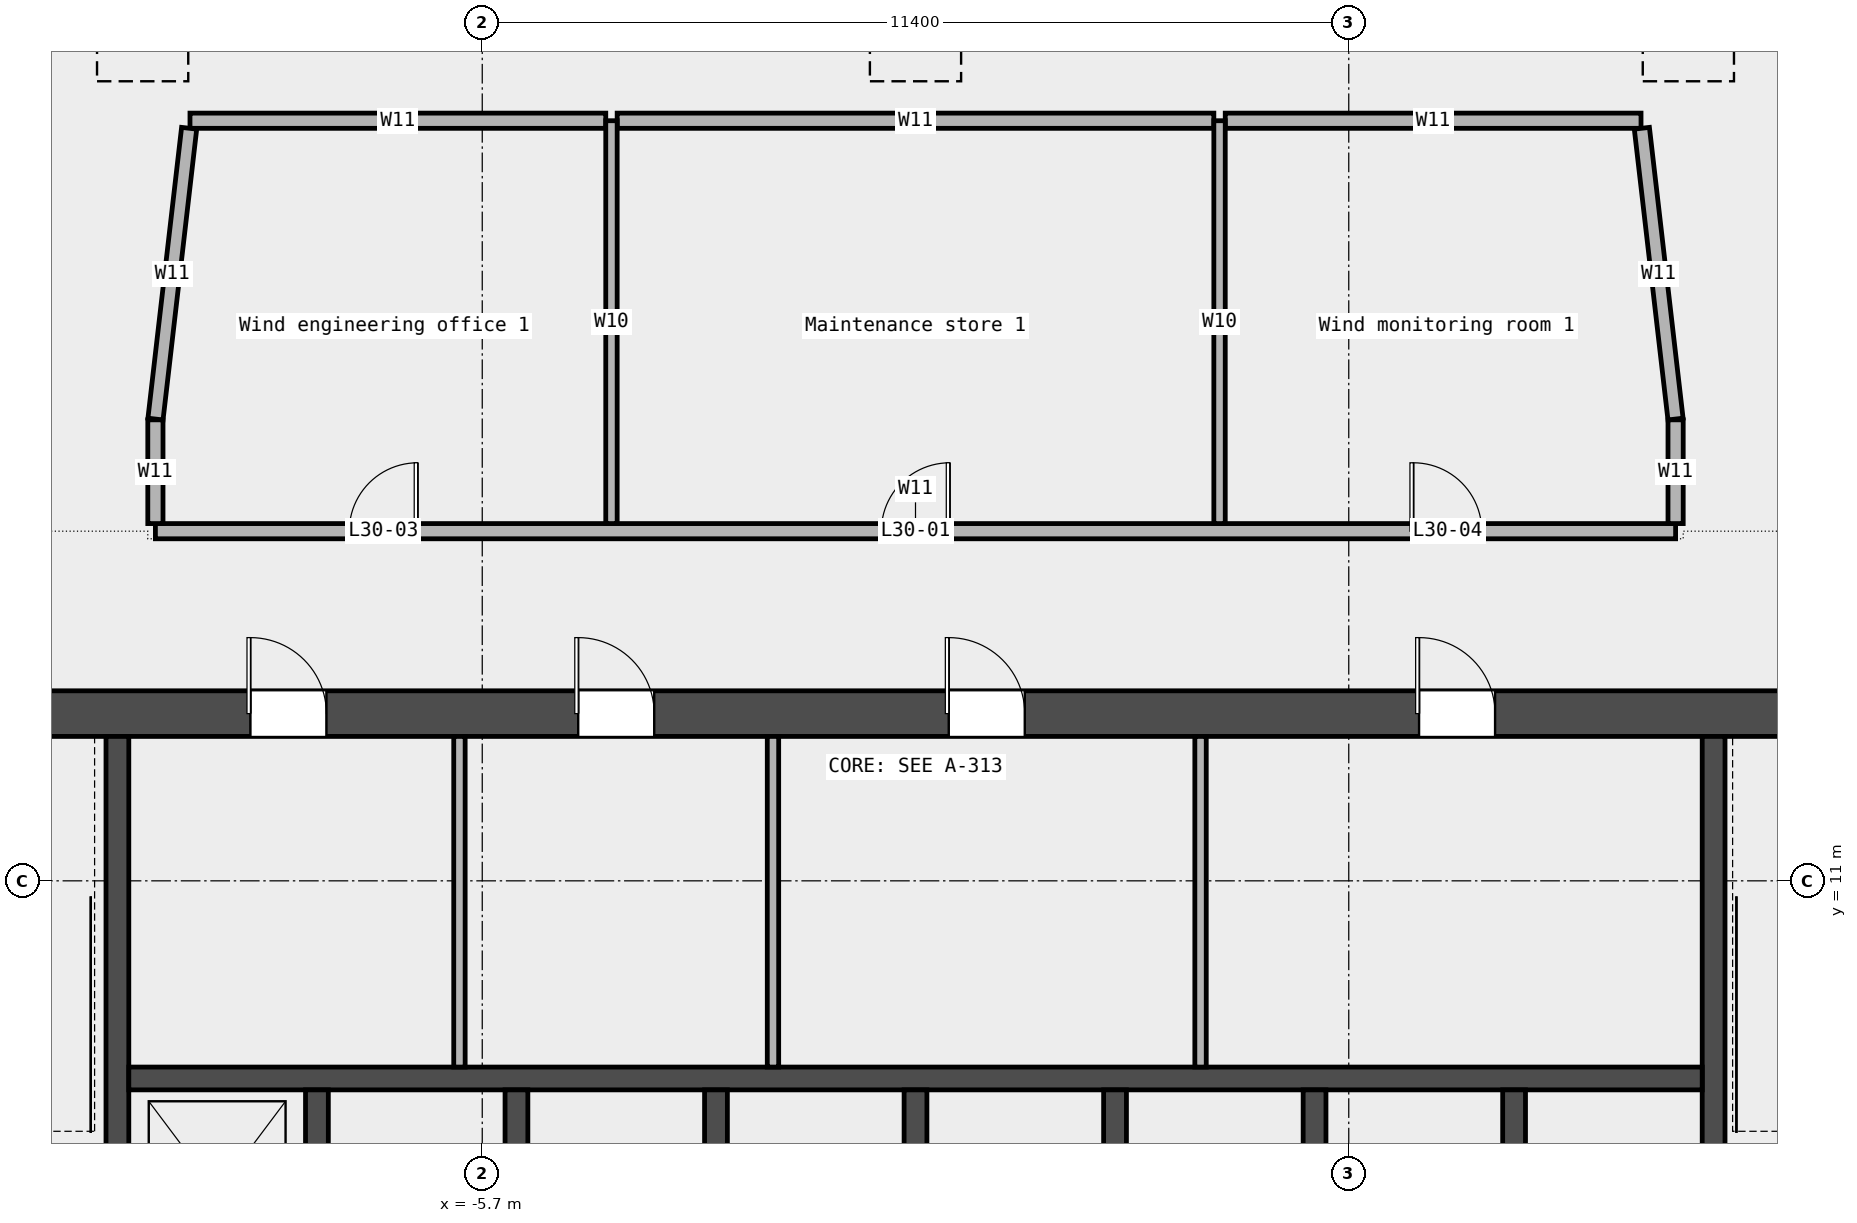
"""IFC4 building model, lengths in metres.
Left out: names, types, materials, properties, quantities, classifications, styles, units other than length and angle.
Written with IfcOpenShell. Run it as: python <this file> out.ifc"""

import sys

from ifc_helpers import new_model, si_unit, direction, frame, frame_2d, origin, origin_2d, place, context, subcontext, project, spatial, rectangle, extrude, element, fill, save


model = new_model("IFC4")
c1 = context("Model", 3, precision=1e-05, world=origin(), true_north=direction((0.0, 1.0)))
c2 = subcontext(c1, "Body", "Model", "MODEL_VIEW")
j1 = project(units=[si_unit("LENGTHUNIT", "METRE"), si_unit("PLANEANGLEUNIT", "RADIAN")], contexts=[c1])
p1 = place(None, origin())
s1 = spatial("IfcSite", under=j1, at=p1, CompositionType="ELEMENT")
p2 = place(p1, origin())
s2 = spatial("IfcBuilding", under=s1, at=p2, CompositionType="ELEMENT")
p3 = place(p2, frame((0.0, 0.0, 148.6)))
s3 = spatial("IfcBuildingStorey", under=s2, at=p3, CompositionType="ELEMENT", Elevation=148.6)
p4 = place(p3, frame((11.525, 24.5, 0.0), z_axis=(-0.160463379213, -0.281547116603, 0.94603526629), x_axis=(0.868801799195, -0.495160008196, 0.0)))
e1 = element("IfcColumn", 1, at=p4, inside=s3, PredefinedType="COLUMN", context=c2, shape_type="SweptSolid", body=[
    extrude(rectangle(XDim=1.2, YDim=1.2, at=origin_2d()), origin(), (0.0, 0.0, 1.0), 8.456),
])
p5 = place(p3, frame((0.0, 24.5, 0.0), z_axis=(0.0, -0.285243358686, 0.958455124837), x_axis=(1.0, 0.0, 0.0)))
e2 = element("IfcColumn", 2, at=p5, inside=s3, PredefinedType="COLUMN", context=c2, shape_type="SweptSolid", body=[
    extrude(rectangle(XDim=1.2, YDim=1.2, at=origin_2d()), origin(), (0.0, 0.0, 1.0), 8.347),
])
p6 = place(p3, frame((-11.525, 24.5, 0.0), z_axis=(0.160463379213, -0.281547116603, 0.94603526629), x_axis=(0.868801799195, 0.495160008196, 0.0)))
e3 = element("IfcColumn", 3, at=p6, inside=s3, PredefinedType="COLUMN", context=c2, shape_type="SweptSolid", body=[
    extrude(rectangle(XDim=1.2, YDim=1.2, at=origin_2d()), origin(), (0.0, 0.0, 1.0), 8.456),
])
p7 = place(p3, frame((-10.0, 15.6, 0.0), z_axis=(0.0, 0.0, 1.0), x_axis=(1.0, 0.0, 0.0)))
e4 = element("IfcWall", 4, at=p7, inside=s3, PredefinedType="PARTITIONING", context=c2, shape_type="SweptSolid", body=[
    extrude(rectangle(XDim=20.0, YDim=0.2, at=frame_2d((10.0, 0.0))), origin(), (0.0, 0.0, 1.0), 8.0),
])
p8 = place(p7, frame((9.55, 0.0, 0.0)))
e5 = element("IfcOpeningElement", 5, at=p8, cuts=e4, PredefinedType="OPENING", context=c2, shape_type="SweptSolid", body=[
    extrude(rectangle(XDim=0.9, YDim=2.1, at=frame_2d((0.45, 1.05))), frame((0.0, 0.112, 0.0), z_axis=(0.0, -1.0, 0.0), x_axis=(1.0, 0.0, 0.0)), (0.0, 0.0, 1.0), 0.224),
])
p9 = place(p7, frame((2.55, 0.0, 0.0)))
e6 = element("IfcOpeningElement", 6, at=p9, cuts=e4, PredefinedType="OPENING", context=c2, shape_type="SweptSolid", body=[
    extrude(rectangle(XDim=0.9, YDim=2.1, at=frame_2d((0.45, 1.05))), frame((0.0, 0.112, 0.0), z_axis=(0.0, -1.0, 0.0), x_axis=(1.0, 0.0, 0.0)), (0.0, 0.0, 1.0), 0.224),
])
p10 = place(p7, frame((16.55, 0.0, 0.0)))
e7 = element("IfcOpeningElement", 7, at=p10, cuts=e4, PredefinedType="OPENING", context=c2, shape_type="SweptSolid", body=[
    extrude(rectangle(XDim=0.9, YDim=2.1, at=frame_2d((0.45, 1.05))), frame((0.0, 0.112, 0.0), z_axis=(0.0, -1.0, 0.0), x_axis=(1.0, 0.0, 0.0)), (0.0, 0.0, 1.0), 0.224),
])
p11 = place(p3, frame((-9.545, 21.0, 0.0), z_axis=(0.0, 0.0, 1.0), x_axis=(1.0, 0.0, 0.0)))
e8 = element("IfcWall", 8, at=p11, inside=s3, PredefinedType="PARTITIONING", context=c2, shape_type="SweptSolid", body=[
    extrude(rectangle(XDim=5.47, YDim=0.2, at=frame_2d((2.735, 0.0))), origin(), (0.0, 0.0, 1.0), 8.0),
])
p12 = place(p3, frame((-3.925, 21.0, 0.0), z_axis=(0.0, 0.0, 1.0), x_axis=(1.0, 0.0, 0.0)))
e9 = element("IfcWall", 9, at=p12, inside=s3, PredefinedType="PARTITIONING", context=c2, shape_type="SweptSolid", body=[
    extrude(rectangle(XDim=7.85, YDim=0.2, at=frame_2d((3.925, 0.0))), origin(), (0.0, 0.0, 1.0), 8.0),
])
p13 = place(p3, frame((4.075, 21.0, 0.0), z_axis=(0.0, 0.0, 1.0), x_axis=(1.0, 0.0, 0.0)))
e10 = element("IfcWall", 10, at=p13, inside=s3, PredefinedType="PARTITIONING", context=c2, shape_type="SweptSolid", body=[
    extrude(rectangle(XDim=5.47, YDim=0.2, at=frame_2d((2.735, 0.0))), origin(), (0.0, 0.0, 1.0), 8.0),
])
p14 = place(p3, frame((-10.0, 15.7, 0.0), z_axis=(0.0, 0.0, 1.0), x_axis=(0.0, 1.0, 0.0)))
e11 = element("IfcWall", 11, at=p14, inside=s3, PredefinedType="PARTITIONING", context=c2, shape_type="SweptSolid", body=[
    extrude(rectangle(XDim=1.365, YDim=0.2, at=frame_2d((0.683, 0.0))), origin(), (0.0, 0.0, 1.0), 8.0),
])
for number, where, z_axis, x_axis in (
    (12, (-4.0, 15.7, 0.0), (0.0, 0.0, 1.0), (0.0, 1.0, 0.0)),
    (13, (4.0, 15.7, 0.0), (0.0, 0.0, 1.0), (0.0, 1.0, 0.0)),
):
    element("IfcWall", number, at=place(p3, frame(where, z_axis=z_axis, x_axis=x_axis)), inside=s3, PredefinedType="PARTITIONING", context=c2, shape_type="SweptSolid", body=[
        extrude(rectangle(XDim=5.3, YDim=0.15, at=frame_2d((2.65, 0.0))), origin(), (0.0, 0.0, 1.0), 8.0),
    ])
p15 = place(p3, frame((10.0, 15.7, 0.0), z_axis=(0.0, 0.0, 1.0), x_axis=(0.0, 1.0, 0.0)))
e14 = element("IfcWall", 14, at=p15, inside=s3, PredefinedType="PARTITIONING", context=c2, shape_type="SweptSolid", body=[
    extrude(rectangle(XDim=1.365, YDim=0.2, at=frame_2d((0.683, 0.0))), origin(), (0.0, 0.0, 1.0), 8.0),
])
for number, where, z_axis, x_axis in (
    (15, (-9.999, 17.075, 0.0), (0.0, 0.0, 1.0), (0.115, 0.993, 0.0)),
    (16, (9.556, 20.901, 0.0), (0.0, 0.0, 1.0), (0.115, -0.993, 0.0)),
):
    element("IfcWall", number, at=place(p3, frame(where, z_axis=z_axis, x_axis=x_axis)), inside=s3, PredefinedType="PARTITIONING", context=c2, shape_type="SweptSolid", body=[
        extrude(rectangle(XDim=3.852, YDim=0.2, at=frame_2d((1.926, 0.0))), origin(), (0.0, 0.0, 1.0), 8.0),
    ])
p16 = place(p3, frame((-14.4, 13.2, 0.0), z_axis=(0.0, 0.0, 1.0), x_axis=(1.0, 0.0, 0.0)))
e17 = element("IfcWall", 17, at=p16, inside=s3, PredefinedType="SHEAR", context=c2, shape_type="SweptSolid", body=[
    extrude(rectangle(XDim=28.8, YDim=0.6, at=frame_2d((14.4, 0.0))), origin(), (0.0, 0.0, 1.0), 8.1),
])
p17 = place(p16, frame((5.65, 0.0, 0.0)))
e18 = element("IfcOpeningElement", 18, at=p17, cuts=e17, PredefinedType="OPENING", context=c2, shape_type="SweptSolid", body=[
    extrude(rectangle(XDim=1.0, YDim=2.1, at=frame_2d((0.5, 1.05))), frame((0.0, 0.312, 0.0), z_axis=(0.0, -1.0, 0.0), x_axis=(1.0, 0.0, 0.0)), (0.0, 0.0, 1.0), 0.624),
])
p18 = place(p16, frame((9.962, 0.0, 0.0)))
e19 = element("IfcOpeningElement", 19, at=p18, cuts=e17, PredefinedType="OPENING", context=c2, shape_type="SweptSolid", body=[
    extrude(rectangle(XDim=1.0, YDim=2.1, at=frame_2d((0.5, 1.05))), frame((0.0, 0.312, 0.0), z_axis=(0.0, -1.0, 0.0), x_axis=(1.0, 0.0, 0.0)), (0.0, 0.0, 1.0), 0.624),
])
p19 = place(p16, frame((14.837, 0.0, 0.0)))
e20 = element("IfcOpeningElement", 20, at=p19, cuts=e17, PredefinedType="OPENING", context=c2, shape_type="SweptSolid", body=[
    extrude(rectangle(XDim=1.0, YDim=2.1, at=frame_2d((0.5, 1.05))), frame((0.0, 0.312, 0.0), z_axis=(0.0, -1.0, 0.0), x_axis=(1.0, 0.0, 0.0)), (0.0, 0.0, 1.0), 0.624),
])
p20 = place(p16, frame((21.025, 0.0, 0.0)))
e21 = element("IfcOpeningElement", 21, at=p20, cuts=e17, PredefinedType="OPENING", context=c2, shape_type="SweptSolid", body=[
    extrude(rectangle(XDim=1.0, YDim=2.1, at=frame_2d((0.5, 1.05))), frame((0.0, 0.312, 0.0), z_axis=(0.0, -1.0, 0.0), x_axis=(1.0, 0.0, 0.0)), (0.0, 0.0, 1.0), 0.624),
])
for number, where, z_axis, x_axis in (
    (22, (-10.5, 5.25, 0.0), (0.0, 0.0, 1.0), (0.0, 1.0, 0.0)),
    (23, (10.5, 5.25, 0.0), (0.0, 0.0, 1.0), (0.0, 1.0, 0.0)),
):
    element("IfcWall", number, at=place(p3, frame(where, z_axis=z_axis, x_axis=x_axis)), inside=s3, PredefinedType="SHEAR", context=c2, shape_type="SweptSolid", body=[
        extrude(rectangle(XDim=7.65, YDim=0.3, at=frame_2d((3.825, 0.0))), origin(), (0.0, 0.0, 1.0), 8.1),
    ])
p21 = place(p3, frame((-10.35, 8.4, 0.0), z_axis=(0.0, 0.0, 1.0), x_axis=(1.0, 0.0, 0.0)))
e24 = element("IfcWall", 24, at=p21, inside=s3, PredefinedType="SOLIDWALL", context=c2, shape_type="SweptSolid", body=[
    extrude(rectangle(XDim=20.7, YDim=0.3, at=frame_2d((10.35, 0.0))), origin(), (0.0, 0.0, 1.0), 8.1),
])
for number, where, z_axis, x_axis in (
    (25, (-7.875, 5.55, 0.0), (0.0, 0.0, 1.0), (0.0, 1.0, 0.0)),
    (26, (-5.25, 5.55, 0.0), (0.0, 0.0, 1.0), (0.0, 1.0, 0.0)),
    (27, (-2.625, 5.55, 0.0), (0.0, 0.0, 1.0), (0.0, 1.0, 0.0)),
    (28, (0.0, 5.55, 0.0), (0.0, 0.0, 1.0), (0.0, 1.0, 0.0)),
    (29, (2.625, 5.55, 0.0), (0.0, 0.0, 1.0), (0.0, 1.0, 0.0)),
    (30, (5.25, 5.55, 0.0), (0.0, 0.0, 1.0), (0.0, 1.0, 0.0)),
    (31, (7.875, 5.55, 0.0), (0.0, 0.0, 1.0), (0.0, 1.0, 0.0)),
):
    element("IfcWall", number, at=place(p3, frame(where, z_axis=z_axis, x_axis=x_axis)), inside=s3, PredefinedType="SOLIDWALL", context=c2, shape_type="SweptSolid", body=[
        extrude(rectangle(XDim=2.7, YDim=0.3, at=frame_2d((1.35, 0.0))), origin(), (0.0, 0.0, 1.0), 8.1),
    ])
for number, where, z_axis, x_axis in (
    (32, (-6.0, 8.55, 0.0), (0.0, 0.0, 1.0), (0.0, 1.0, 0.0)),
    (33, (-1.875, 8.55, 0.0), (0.0, 0.0, 1.0), (0.0, 1.0, 0.0)),
    (34, (3.75, 8.55, 0.0), (0.0, 0.0, 1.0), (0.0, 1.0, 0.0)),
):
    element("IfcWall", number, at=place(p3, frame(where, z_axis=z_axis, x_axis=x_axis)), inside=s3, PredefinedType="PARTITIONING", context=c2, shape_type="SweptSolid", body=[
        extrude(rectangle(XDim=4.35, YDim=0.15, at=frame_2d((2.175, 0.0))), origin(), (0.0, 0.0, 1.0), 8.1),
    ])
p22 = place(p8, origin())
e35 = element("IfcDoor", 35, at=p22, inside=s3, OperationType="SINGLE_SWING_RIGHT", PredefinedType="DOOR", context=c2, shape_type="SweptSolid", body=[
    extrude(rectangle(XDim=0.9, YDim=2.1, at=frame_2d((0.45, 1.05))), frame((0.0, 0.025, 0.0), z_axis=(0.0, -1.0, 0.0), x_axis=(1.0, 0.0, 0.0)), (0.0, 0.0, 1.0), 0.05),
])
fill(e5, e35)
p23 = place(p9, origin())
e36 = element("IfcDoor", 36, at=p23, inside=s3, OperationType="SINGLE_SWING_RIGHT", PredefinedType="DOOR", context=c2, shape_type="SweptSolid", body=[
    extrude(rectangle(XDim=0.9, YDim=2.1, at=frame_2d((0.45, 1.05))), frame((0.0, 0.025, 0.0), z_axis=(0.0, -1.0, 0.0), x_axis=(1.0, 0.0, 0.0)), (0.0, 0.0, 1.0), 0.05),
])
fill(e6, e36)
p24 = place(p10, origin())
e37 = element("IfcDoor", 37, at=p24, inside=s3, OperationType="SINGLE_SWING_LEFT", PredefinedType="DOOR", context=c2, shape_type="SweptSolid", body=[
    extrude(rectangle(XDim=0.9, YDim=2.1, at=frame_2d((0.45, 1.05))), frame((0.0, 0.025, 0.0), z_axis=(0.0, -1.0, 0.0), x_axis=(1.0, 0.0, 0.0)), (0.0, 0.0, 1.0), 0.05),
])
fill(e7, e37)
p25 = place(p17, origin())
e38 = element("IfcDoor", 38, at=p25, inside=s3, OperationType="SINGLE_SWING_LEFT", PredefinedType="DOOR", context=c2, shape_type="SweptSolid", body=[
    extrude(rectangle(XDim=1.0, YDim=2.1, at=frame_2d((0.5, 1.05))), frame((0.0, 0.025, 0.0), z_axis=(0.0, -1.0, 0.0), x_axis=(1.0, 0.0, 0.0)), (0.0, 0.0, 1.0), 0.05),
])
fill(e18, e38)
p26 = place(p18, origin())
e39 = element("IfcDoor", 39, at=p26, inside=s3, OperationType="SINGLE_SWING_LEFT", PredefinedType="DOOR", context=c2, shape_type="SweptSolid", body=[
    extrude(rectangle(XDim=1.0, YDim=2.1, at=frame_2d((0.5, 1.05))), frame((0.0, 0.025, 0.0), z_axis=(0.0, -1.0, 0.0), x_axis=(1.0, 0.0, 0.0)), (0.0, 0.0, 1.0), 0.05),
])
fill(e19, e39)
p27 = place(p19, origin())
e40 = element("IfcDoor", 40, at=p27, inside=s3, OperationType="SINGLE_SWING_LEFT", PredefinedType="DOOR", context=c2, shape_type="SweptSolid", body=[
    extrude(rectangle(XDim=1.0, YDim=2.1, at=frame_2d((0.5, 1.05))), frame((0.0, 0.025, 0.0), z_axis=(0.0, -1.0, 0.0), x_axis=(1.0, 0.0, 0.0)), (0.0, 0.0, 1.0), 0.05),
])
fill(e20, e40)
p28 = place(p20, origin())
e41 = element("IfcDoor", 41, at=p28, inside=s3, OperationType="SINGLE_SWING_LEFT", PredefinedType="DOOR", context=c2, shape_type="SweptSolid", body=[
    extrude(rectangle(XDim=1.0, YDim=2.1, at=frame_2d((0.5, 1.05))), frame((0.0, 0.025, 0.0), z_axis=(0.0, -1.0, 0.0), x_axis=(1.0, 0.0, 0.0)), (0.0, 0.0, 1.0), 0.05),
])
fill(e21, e41)
save(model, sys.argv[1])
